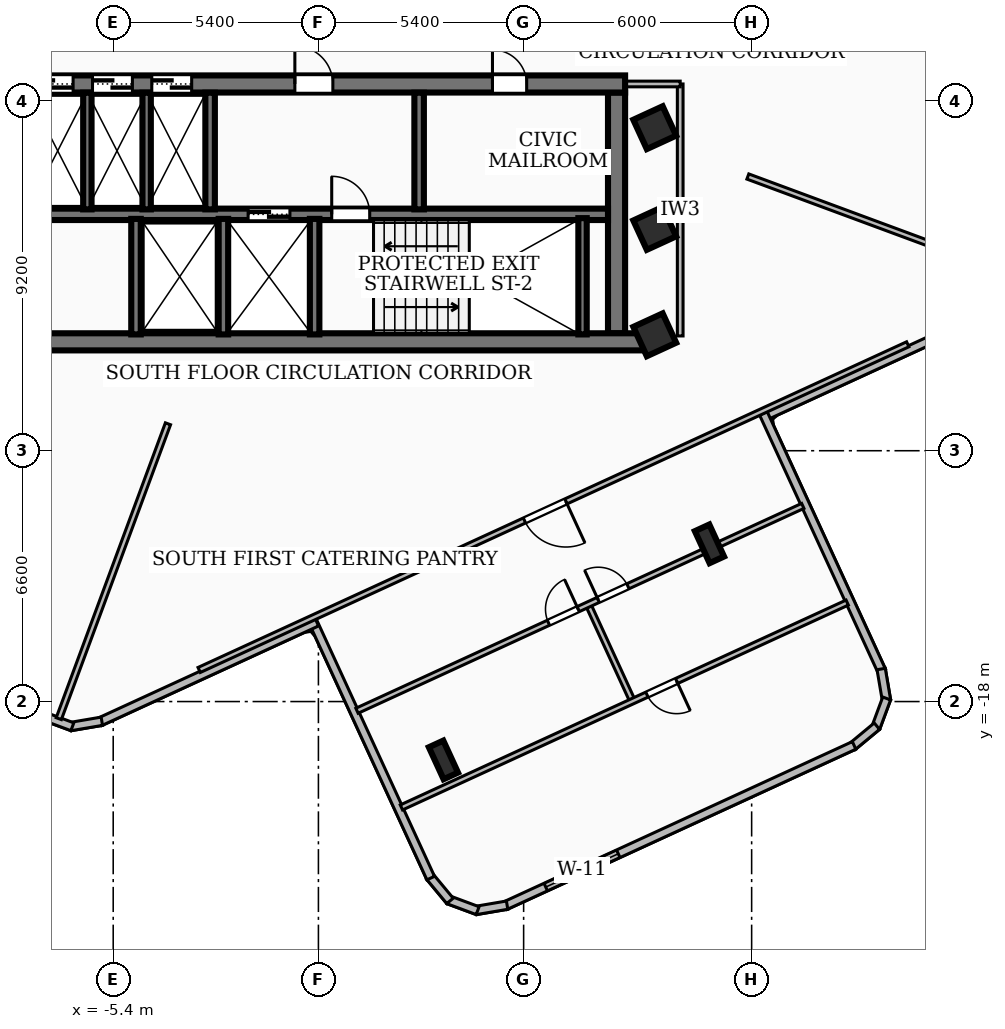
"""IFC4 building model, lengths in metres.
Left out: names, types, materials, properties, quantities, classifications, styles, units other than length and angle.
Written with IfcOpenShell. Run it as: python <this file> out.ifc"""

import sys

from ifc_helpers import new_model, si_unit, direction, frame, frame_2d, origin, origin_2d, place, context, subcontext, project, spatial, rectangle, i_section, extrude, element, fill, save


model = new_model("IFC4")
c1 = context("Model", 3, precision=1e-05, world=origin(), true_north=direction((0.0, 1.0)))
c2 = subcontext(c1, "Body", "Model", "MODEL_VIEW")
j1 = project(units=[si_unit("LENGTHUNIT", "METRE"), si_unit("PLANEANGLEUNIT", "RADIAN")], contexts=[c1])
p1 = place(None, origin())
s1 = spatial("IfcSite", under=j1, at=p1, CompositionType="ELEMENT")
p2 = place(p1, origin())
s2 = spatial("IfcBuilding", under=s1, at=p2, CompositionType="ELEMENT")
p3 = place(p2, frame((0.0, 0.0, 184.68)))
s3 = spatial("IfcBuildingStorey", under=s2, at=p3, CompositionType="ELEMENT", Elevation=184.68)
p4 = place(p3, frame((8.78, -8.535, 0.0), z_axis=(0.0, 0.0, 1.0), x_axis=(-1.0, 0.0, 0.0)))
e1 = element("IfcWall", 1, at=p4, inside=s3, PredefinedType="SHEAR", context=c2, shape_type="SweptSolid", body=[
    extrude(rectangle(XDim=17.56, YDim=0.45, at=frame_2d((8.78, 0.0))), origin(), (0.0, 0.0, 1.0), 3.34),
])
p5 = place(p3, frame((-8.07, -1.75, 0.0), z_axis=(0.0, 0.0, 1.0), x_axis=(1.0, 0.0, 0.0)))
e2 = element("IfcWall", 2, at=p5, inside=s3, PredefinedType="SHEAR", context=c2, shape_type="SweptSolid", body=[
    extrude(rectangle(XDim=16.14, YDim=0.45, at=frame_2d((8.07, 0.0))), origin(), (0.0, 0.0, 1.0), 3.34),
])
p6 = place(p5, frame((7.45, 0.0, 0.0)))
e3 = element("IfcOpeningElement", 3, at=p6, cuts=e2, PredefinedType="OPENING", context=c2, shape_type="SweptSolid", body=[
    extrude(rectangle(XDim=1.0, YDim=2.1, at=frame_2d((0.5, 1.05))), frame((0.0, 0.235, 0.0), z_axis=(0.0, -1.0, 0.0), x_axis=(1.0, 0.0, 0.0)), (0.0, 0.0, 1.0), 0.47),
])
p7 = place(p5, frame((12.65, 0.0, 0.0)))
e4 = element("IfcOpeningElement", 4, at=p7, cuts=e2, PredefinedType="OPENING", context=c2, shape_type="SweptSolid", body=[
    extrude(rectangle(XDim=0.9, YDim=2.06, at=frame_2d((0.45, 1.03))), frame((0.0, 0.235, 0.0), z_axis=(0.0, -1.0, 0.0), x_axis=(1.0, 0.0, 0.0)), (0.0, 0.0, 1.0), 0.47),
])
p8 = place(p5, frame((0.565, 0.0, 0.0)))
e5 = element("IfcOpeningElement", 5, at=p8, cuts=e2, PredefinedType="OPENING", context=c2, shape_type="SweptSolid", body=[
    extrude(rectangle(XDim=1.05, YDim=2.15, at=frame_2d((0.525, 1.075))), frame((0.0, 0.235, 0.0), z_axis=(0.0, -1.0, 0.0), x_axis=(1.0, 0.0, 0.0)), (0.0, 0.0, 1.0), 0.47),
])
p9 = place(p5, frame((2.125, 0.0, 0.0)))
e6 = element("IfcOpeningElement", 6, at=p9, cuts=e2, PredefinedType="OPENING", context=c2, shape_type="SweptSolid", body=[
    extrude(rectangle(XDim=1.05, YDim=2.15, at=frame_2d((0.525, 1.075))), frame((0.0, 0.235, 0.0), z_axis=(0.0, -1.0, 0.0), x_axis=(1.0, 0.0, 0.0)), (0.0, 0.0, 1.0), 0.47),
])
p10 = place(p5, frame((3.685, 0.0, 0.0)))
e7 = element("IfcOpeningElement", 7, at=p10, cuts=e2, PredefinedType="OPENING", context=c2, shape_type="SweptSolid", body=[
    extrude(rectangle(XDim=1.05, YDim=2.15, at=frame_2d((0.525, 1.075))), frame((0.0, 0.235, 0.0), z_axis=(0.0, -1.0, 0.0), x_axis=(1.0, 0.0, 0.0)), (0.0, 0.0, 1.0), 0.47),
])
p11 = place(p3, frame((7.845, -1.975, 0.0), z_axis=(0.0, 0.0, 1.0), x_axis=(0.0, -1.0, 0.0)))
e8 = element("IfcWall", 8, at=p11, inside=s3, PredefinedType="SHEAR", context=c2, shape_type="SweptSolid", body=[
    extrude(rectangle(XDim=6.335, YDim=0.45, at=frame_2d((3.167, 0.0))), origin(), (0.0, 0.0, 1.0), 3.34),
])
p12 = place(p3, frame((-7.62, -5.18, 0.0), z_axis=(0.0, 0.0, 1.0), x_axis=(1.0, 0.0, 0.0)))
e9 = element("IfcWall", 9, at=p12, inside=s3, PredefinedType="SOLIDWALL", context=c2, shape_type="SweptSolid", body=[
    extrude(rectangle(XDim=15.24, YDim=0.3, at=frame_2d((7.62, 0.0))), origin(), (0.0, 0.0, 1.0), 3.34),
])
p13 = place(p12, frame((5.77, 0.0, 0.0)))
e10 = element("IfcOpeningElement", 10, at=p13, cuts=e9, PredefinedType="OPENING", context=c2, shape_type="SweptSolid", body=[
    extrude(rectangle(XDim=1.1, YDim=2.15, at=frame_2d((0.55, 1.075))), frame((0.0, 0.16, 0.0), z_axis=(0.0, -1.0, 0.0), x_axis=(1.0, 0.0, 0.0)), (0.0, 0.0, 1.0), 0.32),
])
p14 = place(p12, frame((7.97, 0.0, 0.0)))
e11 = element("IfcOpeningElement", 11, at=p14, cuts=e9, PredefinedType="OPENING", context=c2, shape_type="SweptSolid", body=[
    extrude(rectangle(XDim=1.0, YDim=2.1, at=frame_2d((0.5, 1.05))), frame((0.0, 0.16, 0.0), z_axis=(0.0, -1.0, 0.0), x_axis=(1.0, 0.0, 0.0)), (0.0, 0.0, 1.0), 0.32),
])
p15 = place(p3, frame((6.95, -8.34, 0.0), z_axis=(0.0, 0.0, 1.0), x_axis=(0.0, 1.0, 0.0)))
e12 = element("IfcWall", 12, at=p15, inside=s3, PredefinedType="SOLIDWALL", context=c2, shape_type="SweptSolid", body=[
    extrude(rectangle(XDim=3.06, YDim=0.22, at=frame_2d((1.53, 0.0))), origin(), (0.0, 0.0, 1.0), 3.34),
])
for number, where, z_axis, x_axis in (
    (13, (-0.1, -8.34, 0.0), (0.0, 0.0, 1.0), (0.0, 1.0, 0.0)),
    (14, (-2.5, -8.34, 0.0), (0.0, 0.0, 1.0), (0.0, 1.0, 0.0)),
    (15, (-4.8, -8.34, 0.0), (0.0, 0.0, 1.0), (0.0, 1.0, 0.0)),
):
    element("IfcWall", number, at=place(p3, frame(where, z_axis=z_axis, x_axis=x_axis)), inside=s3, PredefinedType="SOLIDWALL", context=c2, shape_type="SweptSolid", body=[
        extrude(rectangle(XDim=3.04, YDim=0.25, at=frame_2d((1.52, 0.0))), origin(), (0.0, 0.0, 1.0), 3.34),
    ])
for number, where, z_axis, x_axis in (
    (16, (-2.85, -5.05, 0.0), (0.0, 0.0, 1.0), (0.0, 1.0, 0.0)),
    (17, (2.65, -5.05, 0.0), (0.0, 0.0, 1.0), (0.0, 1.0, 0.0)),
):
    element("IfcWall", number, at=place(p3, frame(where, z_axis=z_axis, x_axis=x_axis)), inside=s3, PredefinedType="SOLIDWALL", context=c2, shape_type="SweptSolid", body=[
        extrude(rectangle(XDim=3.07, YDim=0.25, at=frame_2d((1.535, 0.0))), origin(), (0.0, 0.0, 1.0), 3.34),
    ])
for number, where, z_axis, x_axis in (
    (18, (-6.08, -5.05, 0.0), (0.0, 0.0, 1.0), (0.0, 1.0, 0.0)),
    (19, (-4.52, -5.05, 0.0), (0.0, 0.0, 1.0), (0.0, 1.0, 0.0)),
):
    element("IfcWall", number, at=place(p3, frame(where, z_axis=z_axis, x_axis=x_axis)), inside=s3, PredefinedType="SOLIDWALL", context=c2, shape_type="SweptSolid", body=[
        extrude(rectangle(XDim=3.07, YDim=0.22, at=frame_2d((1.535, 0.0))), origin(), (0.0, 0.0, 1.0), 3.34),
    ])
for number, where, z_axis, x_axis in (
    (20, (8.85, -5.55, 0.0), (0.0, 0.0, 1.0), (0.909, 0.418, 0.0)),
    (21, (8.85, -2.9, 0.0), (0.0, 0.0, 1.0), (0.909, 0.418, 0.0)),
    (22, (8.85, -8.35, 0.0), (0.0, 0.0, 1.0), (0.909, 0.418, 0.0)),
):
    element("IfcColumn", number, at=place(p3, frame(where, z_axis=z_axis, x_axis=x_axis)), inside=s3, PredefinedType="COLUMN", context=c2, shape_type="SweptSolid", body=[
        extrude(rectangle(XDim=0.85, YDim=0.85, at=origin_2d()), origin(), (0.0, 0.0, 1.0), 3.6),
    ])
for number, where, z_axis, x_axis in (
    (23, (3.29, -19.536, 0.0), (0.0, 0.0, 1.0), (0.909, 0.418, 0.0)),
    (24, (10.29, -13.85, 0.0), (0.0, 0.0, 1.0), (0.909, 0.418, 0.0)),
):
    element("IfcColumn", number, at=place(p3, frame(where, z_axis=z_axis, x_axis=x_axis)), inside=s3, PredefinedType="COLUMN", context=c2, shape_type="SweptSolid", body=[
        extrude(i_section(OverallWidth=0.418, OverallDepth=0.927, WebThickness=0.019, FlangeThickness=0.032, at=origin_2d()), origin(), (0.0, 0.0, 1.0), 3.6),
    ])
p16 = place(p3, frame((15.911, -0.042, 0.0), z_axis=(0.0, 0.0, 1.0), x_axis=(0.417479344719, -0.908686412759, 0.0)))
e25 = element("IfcWall", 25, at=p16, inside=s3, PredefinedType="SOLIDWALL", context=c2, shape_type="SweptSolid", body=[
    extrude(rectangle(XDim=6.278, YDim=0.22, at=frame_2d((3.139, 0.0))), origin(), (0.0, 0.0, 1.0), 3.34),
])
p17 = place(p3, frame((17.806, -7.71, 0.0), z_axis=(0.0, 0.0, 1.0), x_axis=(-0.908646468859, -0.417566275734, 0.0)))
e26 = element("IfcWall", 26, at=p17, inside=s3, PredefinedType="SOLIDWALL", context=c2, shape_type="SweptSolid", body=[
    extrude(rectangle(XDim=6.758, YDim=0.22, at=frame_2d((3.379, 0.0))), origin(), (0.0, 0.0, 1.0), 3.34),
])
p18 = place(p3, frame((11.708, -10.415, 0.0), z_axis=(0.0, 0.0, 1.0), x_axis=(0.417535966584, -0.908660396743, 0.0)))
e27 = element("IfcWall", 27, at=p18, inside=s3, PredefinedType="SOLIDWALL", context=c2, shape_type="SweptSolid", body=[
    extrude(rectangle(XDim=7.458, YDim=0.22, at=frame_2d((3.729, 0.0))), origin(), (0.0, 0.0, 1.0), 3.34),
])
p19 = place(p3, frame((14.808, -17.144, 0.0), z_axis=(0.0, 0.0, 1.0), x_axis=(0.167575597201, -0.985859228908, 0.0)))
e28 = element("IfcWall", 28, at=p19, inside=s3, PredefinedType="SOLIDWALL", context=c2, shape_type="SweptSolid", body=[
    extrude(rectangle(XDim=0.835, YDim=0.22, at=frame_2d((0.417, 0.0))), origin(), (0.0, 0.0, 1.0), 3.34),
])
p20 = place(p3, frame((14.953, -17.919, 0.0), z_axis=(0.0, 0.0, 1.0), x_axis=(-0.347789921671, -0.937572488069, 0.0)))
e29 = element("IfcWall", 29, at=p20, inside=s3, PredefinedType="SOLIDWALL", context=c2, shape_type="SweptSolid", body=[
    extrude(rectangle(XDim=0.819, YDim=0.22, at=frame_2d((0.41, 0.0))), origin(), (0.0, 0.0, 1.0), 3.34),
])
p21 = place(p3, frame((14.696, -18.648, 0.0), z_axis=(0.0, 0.0, 1.0), x_axis=(-0.770042109777, -0.637993063576, 0.0)))
e30 = element("IfcWall", 30, at=p21, inside=s3, PredefinedType="SOLIDWALL", context=c2, shape_type="SweptSolid", body=[
    extrude(rectangle(XDim=0.834, YDim=0.22, at=frame_2d((0.417, 0.0))), origin(), (0.0, 0.0, 1.0), 3.34),
])
p22 = place(p3, frame((14.096, -19.154, 0.0), z_axis=(0.0, 0.0, 1.0), x_axis=(-0.90868873868, -0.417474282076, 0.0)))
e31 = element("IfcWall", 31, at=p22, inside=s3, PredefinedType="SOLIDWALL", context=c2, shape_type="SweptSolid", body=[
    extrude(rectangle(XDim=10.101, YDim=0.22, at=frame_2d((5.051, 0.0))), origin(), (0.0, 0.0, 1.0), 3.34),
])
p23 = place(p22, frame((6.829, 0.0, 0.85)))
e32 = element("IfcOpeningElement", 32, at=p23, cuts=e31, PredefinedType="OPENING", context=c2, shape_type="SweptSolid", body=[
    extrude(rectangle(XDim=2.1, YDim=1.6, at=frame_2d((1.05, 0.8))), frame((0.0, 0.12, 0.0), z_axis=(0.0, -1.0, 0.0), x_axis=(1.0, 0.0, 0.0)), (0.0, 0.0, 1.0), 0.24),
])
p24 = place(p3, frame((4.965, -23.357, 0.0), z_axis=(0.0, 0.0, 1.0), x_axis=(-0.985810875322, -0.167859816801, 0.0)))
e33 = element("IfcWall", 33, at=p24, inside=s3, PredefinedType="SOLIDWALL", context=c2, shape_type="SweptSolid", body=[
    extrude(rectangle(XDim=0.835, YDim=0.22, at=frame_2d((0.417, 0.0))), origin(), (0.0, 0.0, 1.0), 3.34),
])
p25 = place(p3, frame((4.19, -23.502, 0.0), z_axis=(0.0, 0.0, 1.0), x_axis=(-0.937391870112, 0.348276444578, 0.0)))
e34 = element("IfcWall", 34, at=p25, inside=s3, PredefinedType="SOLIDWALL", context=c2, shape_type="SweptSolid", body=[
    extrude(rectangle(XDim=0.818, YDim=0.22, at=frame_2d((0.409, 0.0))), origin(), (0.0, 0.0, 1.0), 3.34),
])
p26 = place(p3, frame((3.462, -23.245, 0.0), z_axis=(0.0, 0.0, 1.0), x_axis=(-0.638686746413, 0.769466854359, 0.0)))
e35 = element("IfcWall", 35, at=p26, inside=s3, PredefinedType="SOLIDWALL", context=c2, shape_type="SweptSolid", body=[
    extrude(rectangle(XDim=0.834, YDim=0.22, at=frame_2d((0.417, 0.0))), origin(), (0.0, 0.0, 1.0), 3.34),
])
p27 = place(p3, frame((2.955, -22.645, 0.0), z_axis=(0.0, 0.0, 1.0), x_axis=(-0.417523547277, 0.9086661034, 0.0)))
e36 = element("IfcWall", 36, at=p27, inside=s3, PredefinedType="SOLIDWALL", context=c2, shape_type="SweptSolid", body=[
    extrude(rectangle(XDim=7.458, YDim=0.22, at=frame_2d((3.729, 0.0))), origin(), (0.0, 0.0, 1.0), 3.34),
])
p28 = place(p3, frame((-0.042, -15.911, 0.0), z_axis=(0.0, 0.0, 1.0), x_axis=(-0.908686412759, -0.417479344719, 0.0)))
e37 = element("IfcWall", 37, at=p28, inside=s3, PredefinedType="SOLIDWALL", context=c2, shape_type="SweptSolid", body=[
    extrude(rectangle(XDim=6.278, YDim=0.22, at=frame_2d((3.139, 0.0))), origin(), (0.0, 0.0, 1.0), 3.34),
])
p29 = place(p3, frame((-5.699, -18.518, 0.0), z_axis=(0.0, 0.0, 1.0), x_axis=(-0.985892022342, -0.167382556682, 0.0)))
e38 = element("IfcWall", 38, at=p29, inside=s3, PredefinedType="SOLIDWALL", context=c2, shape_type="SweptSolid", body=[
    extrude(rectangle(XDim=0.836, YDim=0.22, at=frame_2d((0.418, 0.0))), origin(), (0.0, 0.0, 1.0), 3.34),
])
p30 = place(p3, frame((-6.475, -18.663, 0.0), z_axis=(0.0, 0.0, 1.0), x_axis=(-0.937294412261, 0.348538641681, 0.0)))
e39 = element("IfcWall", 39, at=p30, inside=s3, PredefinedType="SOLIDWALL", context=c2, shape_type="SweptSolid", body=[
    extrude(rectangle(XDim=0.818, YDim=0.22, at=frame_2d((0.409, 0.0))), origin(), (0.0, 0.0, 1.0), 3.34),
])
p31 = place(p3, frame((9.52, -8.38, 0.0), z_axis=(0.0, 0.0, 1.0), x_axis=(0.0, 1.0, 0.0)))
e40 = element("IfcWall", 40, at=p31, inside=s3, PredefinedType="PARTITIONING", context=c2, shape_type="SweptSolid", body=[
    extrude(rectangle(XDim=6.63, YDim=0.15, at=frame_2d((3.315, 0.0))), origin(), (0.0, 0.0, 1.0), 3.34),
])
p32 = place(p3, frame((7.85, -1.75, 0.0), z_axis=(0.0, 0.0, 1.0), x_axis=(1.0, 0.0, 0.0)))
e41 = element("IfcWall", 41, at=p32, inside=s3, PredefinedType="PARTITIONING", context=c2, shape_type="SweptSolid", body=[
    extrude(rectangle(XDim=1.67, YDim=0.15, at=frame_2d((0.835, 0.0))), origin(), (0.0, 0.0, 1.0), 2.57),
])
p33 = place(p3, frame((-3.959, -10.691, 0.0), z_axis=(0.0, 0.0, 1.0), x_axis=(-0.347243238044, -0.937775097576, 0.0)))
e42 = element("IfcWall", 42, at=p33, inside=s3, PredefinedType="PARTITIONING", context=c2, shape_type="SweptSolid", body=[
    extrude(rectangle(XDim=8.274, YDim=0.145, at=frame_2d((4.137, 0.0))), origin(), (0.0, 0.0, 1.0), 3.34),
])
p34 = place(p3, frame((11.3, -4.185, 0.0), z_axis=(0.0, 0.0, 1.0), x_axis=(0.937797421925, -0.347182942311, 0.0)))
e43 = element("IfcWall", 43, at=p34, inside=s3, PredefinedType="PARTITIONING", context=c2, shape_type="SweptSolid", body=[
    extrude(rectangle(XDim=7.624, YDim=0.145, at=frame_2d((3.812, 0.0))), origin(), (0.0, 0.0, 1.0), 3.34),
])
p35 = place(p3, frame((8.6, 15.508, 0.0), z_axis=(0.0, 0.0, 1.0), x_axis=(0.41757132443, -0.908644148726, 0.0)))
e44 = element("IfcWall", 44, at=p35, inside=s3, PredefinedType="PARTITIONING", context=c2, shape_type="SweptSolid", body=[
    extrude(rectangle(XDim=20.521, YDim=0.145, at=frame_2d((10.26, 0.0))), origin(), (0.0, 0.0, 1.0), 2.644),
])
p36 = place(p35, frame((9.9, 0.0, 0.0)))
e45 = element("IfcOpeningElement", 45, at=p36, cuts=e44, PredefinedType="OPENING", context=c2, shape_type="SweptSolid", body=[
    extrude(rectangle(XDim=1.2, YDim=2.1, at=frame_2d((0.6, 1.05))), frame((0.0, 0.083, 0.0), z_axis=(0.0, -1.0, 0.0), x_axis=(1.0, 0.0, 0.0)), (0.0, 0.0, 1.0), 0.165),
])
p37 = place(p3, frame((15.508, -8.6, 0.0), z_axis=(0.0, 0.0, 1.0), x_axis=(-0.908644148726, -0.41757132443, 0.0)))
e46 = element("IfcWall", 46, at=p37, inside=s3, PredefinedType="PARTITIONING", context=c2, shape_type="SweptSolid", body=[
    extrude(rectangle(XDim=20.521, YDim=0.145, at=frame_2d((10.26, 0.0))), origin(), (0.0, 0.0, 1.0), 2.644),
])
p38 = place(p37, frame((9.9, 0.0, 0.0)))
e47 = element("IfcOpeningElement", 47, at=p38, cuts=e46, PredefinedType="OPENING", context=c2, shape_type="SweptSolid", body=[
    extrude(rectangle(XDim=1.2, YDim=2.1, at=frame_2d((0.6, 1.05))), frame((0.0, 0.083, 0.0), z_axis=(0.0, -1.0, 0.0), x_axis=(1.0, 0.0, 0.0)), (0.0, 0.0, 1.0), 0.165),
])
p39 = place(p3, frame((7.123, -15.502, 0.0), z_axis=(0.0, 0.0, 1.0), x_axis=(0.417526601233, -0.90866470013, 0.0)))
e48 = element("IfcWall", 48, at=p39, inside=s3, PredefinedType="PARTITIONING", context=c2, shape_type="SweptSolid", body=[
    extrude(rectangle(XDim=2.68, YDim=0.145, at=frame_2d((1.34, 0.0))), origin(), (0.0, 0.0, 1.0), 3.34),
])
p40 = place(p3, frame((1.015, -18.242, 0.0), z_axis=(0.0, 0.0, 1.0), x_axis=(0.908680334094, 0.417492575301, 0.0)))
e49 = element("IfcWall", 49, at=p40, inside=s3, PredefinedType="PARTITIONING", context=c2, shape_type="SweptSolid", body=[
    extrude(rectangle(XDim=12.91, YDim=0.145, at=frame_2d((6.455, 0.0))), origin(), (0.0, 0.0, 1.0), 2.644),
])
p41 = place(p40, frame((5.545, 0.0, 0.0)))
e50 = element("IfcOpeningElement", 50, at=p41, cuts=e49, PredefinedType="OPENING", context=c2, shape_type="SweptSolid", body=[
    extrude(rectangle(XDim=0.86, YDim=2.04, at=frame_2d((0.43, 1.02))), frame((0.0, 0.083, 0.0), z_axis=(0.0, -1.0, 0.0), x_axis=(1.0, 0.0, 0.0)), (0.0, 0.0, 1.0), 0.165),
])
p42 = place(p40, frame((6.986, 0.0, 0.0)))
e51 = element("IfcOpeningElement", 51, at=p42, cuts=e49, PredefinedType="OPENING", context=c2, shape_type="SweptSolid", body=[
    extrude(rectangle(XDim=0.86, YDim=2.04, at=frame_2d((0.43, 1.02))), frame((0.0, 0.083, 0.0), z_axis=(0.0, -1.0, 0.0), x_axis=(1.0, 0.0, 0.0)), (0.0, 0.0, 1.0), 0.165),
])
p43 = place(p3, frame((13.915, -15.396, 0.0), z_axis=(0.0, 0.0, 1.0), x_axis=(-0.908677037864, -0.41749974953, 0.0)))
e52 = element("IfcWall", 52, at=p43, inside=s3, PredefinedType="PARTITIONING", context=c2, shape_type="SweptSolid", body=[
    extrude(rectangle(XDim=12.91, YDim=0.145, at=frame_2d((6.455, 0.0))), origin(), (0.0, 0.0, 1.0), 3.34),
])
p44 = place(p43, frame((4.94, 0.0, 0.0)))
e53 = element("IfcOpeningElement", 53, at=p44, cuts=e52, PredefinedType="OPENING", context=c2, shape_type="SweptSolid", body=[
    extrude(rectangle(XDim=0.86, YDim=2.04, at=frame_2d((0.43, 1.02))), frame((0.0, 0.083, 0.0), z_axis=(0.0, -1.0, 0.0), x_axis=(1.0, 0.0, 0.0)), (0.0, 0.0, 1.0), 0.165),
])
p45 = place(p23, origin())
e54 = element("IfcWindow", 54, at=p45, inside=s3, PartitioningType="SINGLE_PANEL", PredefinedType="WINDOW", context=c2, shape_type="SweptSolid", body=[
    extrude(rectangle(XDim=2.1, YDim=1.6, at=frame_2d((1.05, 0.8))), frame((0.0, 0.03, 0.0), z_axis=(0.0, -1.0, 0.0), x_axis=(1.0, 0.0, 0.0)), (0.0, 0.0, 1.0), 0.06),
])
fill(e32, e54)
p46 = place(p6, origin())
e55 = element("IfcDoor", 55, at=p46, inside=s3, OperationType="SINGLE_SWING_LEFT", PredefinedType="DOOR", context=c2, shape_type="SweptSolid", body=[
    extrude(rectangle(XDim=1.0, YDim=2.1, at=frame_2d((0.5, 1.05))), frame((0.0, 0.025, 0.0), z_axis=(0.0, -1.0, 0.0), x_axis=(1.0, 0.0, 0.0)), (0.0, 0.0, 1.0), 0.05),
])
fill(e3, e55)
p47 = place(p13, origin())
e56 = element("IfcDoor", 56, at=p47, inside=s3, OperationType="DOUBLE_DOOR_SLIDING", PredefinedType="DOOR", context=c2, shape_type="SweptSolid", body=[
    extrude(rectangle(XDim=1.1, YDim=2.15, at=frame_2d((0.55, 1.075))), frame((0.0, 0.025, 0.0), z_axis=(0.0, -1.0, 0.0), x_axis=(1.0, 0.0, 0.0)), (0.0, 0.0, 1.0), 0.05),
])
fill(e10, e56)
p48 = place(p14, origin())
e57 = element("IfcDoor", 57, at=p48, inside=s3, OperationType="SINGLE_SWING_LEFT", PredefinedType="DOOR", context=c2, shape_type="SweptSolid", body=[
    extrude(rectangle(XDim=1.0, YDim=2.1, at=frame_2d((0.5, 1.05))), frame((0.0, 0.025, 0.0), z_axis=(0.0, -1.0, 0.0), x_axis=(1.0, 0.0, 0.0)), (0.0, 0.0, 1.0), 0.05),
])
fill(e11, e57)
p49 = place(p7, origin())
e58 = element("IfcDoor", 58, at=p49, inside=s3, OperationType="SINGLE_SWING_LEFT", PredefinedType="DOOR", context=c2, shape_type="SweptSolid", body=[
    extrude(rectangle(XDim=0.9, YDim=2.06, at=frame_2d((0.45, 1.03))), frame((0.0, 0.025, 0.0), z_axis=(0.0, -1.0, 0.0), x_axis=(1.0, 0.0, 0.0)), (0.0, 0.0, 1.0), 0.05),
])
fill(e4, e58)
p50 = place(p8, origin())
e59 = element("IfcDoor", 59, at=p50, inside=s3, OperationType="DOUBLE_DOOR_SLIDING", PredefinedType="DOOR", context=c2, shape_type="SweptSolid", body=[
    extrude(rectangle(XDim=1.05, YDim=2.15, at=frame_2d((0.525, 1.075))), frame((0.0, 0.025, 0.0), z_axis=(0.0, -1.0, 0.0), x_axis=(1.0, 0.0, 0.0)), (0.0, 0.0, 1.0), 0.05),
])
fill(e5, e59)
p51 = place(p9, origin())
e60 = element("IfcDoor", 60, at=p51, inside=s3, OperationType="DOUBLE_DOOR_SLIDING", PredefinedType="DOOR", context=c2, shape_type="SweptSolid", body=[
    extrude(rectangle(XDim=1.05, YDim=2.15, at=frame_2d((0.525, 1.075))), frame((0.0, 0.025, 0.0), z_axis=(0.0, -1.0, 0.0), x_axis=(1.0, 0.0, 0.0)), (0.0, 0.0, 1.0), 0.05),
])
fill(e6, e60)
p52 = place(p10, origin())
e61 = element("IfcDoor", 61, at=p52, inside=s3, OperationType="DOUBLE_DOOR_SLIDING", PredefinedType="DOOR", context=c2, shape_type="SweptSolid", body=[
    extrude(rectangle(XDim=1.05, YDim=2.15, at=frame_2d((0.525, 1.075))), frame((0.0, 0.025, 0.0), z_axis=(0.0, -1.0, 0.0), x_axis=(1.0, 0.0, 0.0)), (0.0, 0.0, 1.0), 0.05),
])
fill(e7, e61)
p53 = place(p38, origin())
e62 = element("IfcDoor", 62, at=p53, inside=s3, OperationType="SINGLE_SWING_LEFT", PredefinedType="DOOR", context=c2, shape_type="SweptSolid", body=[
    extrude(rectangle(XDim=1.2, YDim=2.1, at=frame_2d((0.6, 1.05))), frame((0.0, 0.025, 0.0), z_axis=(0.0, -1.0, 0.0), x_axis=(1.0, 0.0, 0.0)), (0.0, 0.0, 1.0), 0.05),
])
fill(e47, e62)
p54 = place(p41, origin())
e63 = element("IfcDoor", 63, at=p54, inside=s3, OperationType="SINGLE_SWING_RIGHT", PredefinedType="DOOR", context=c2, shape_type="SweptSolid", body=[
    extrude(rectangle(XDim=0.86, YDim=2.04, at=frame_2d((0.43, 1.02))), frame((0.0, 0.025, 0.0), z_axis=(0.0, -1.0, 0.0), x_axis=(1.0, 0.0, 0.0)), (0.0, 0.0, 1.0), 0.05),
])
fill(e50, e63)
p55 = place(p42, origin())
e64 = element("IfcDoor", 64, at=p55, inside=s3, OperationType="SINGLE_SWING_LEFT", PredefinedType="DOOR", context=c2, shape_type="SweptSolid", body=[
    extrude(rectangle(XDim=0.86, YDim=2.04, at=frame_2d((0.43, 1.02))), frame((0.0, 0.025, 0.0), z_axis=(0.0, -1.0, 0.0), x_axis=(1.0, 0.0, 0.0)), (0.0, 0.0, 1.0), 0.05),
])
fill(e51, e64)
p56 = place(p44, origin())
e65 = element("IfcDoor", 65, at=p56, inside=s3, OperationType="SINGLE_SWING_LEFT", PredefinedType="DOOR", context=c2, shape_type="SweptSolid", body=[
    extrude(rectangle(XDim=0.86, YDim=2.04, at=frame_2d((0.43, 1.02))), frame((0.0, 0.025, 0.0), z_axis=(0.0, -1.0, 0.0), x_axis=(1.0, 0.0, 0.0)), (0.0, 0.0, 1.0), 0.05),
])
fill(e53, e65)
save(model, sys.argv[1])
